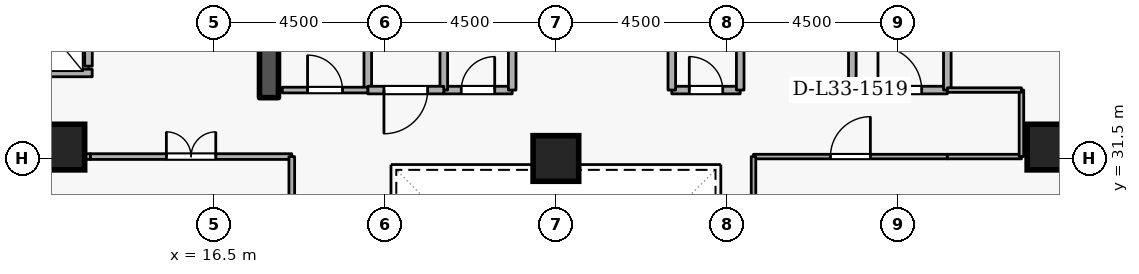
"""IFC4 building model, lengths in metres.
Left out: names, types, materials, properties, quantities, classifications, styles, units other than length and angle.
Written with IfcOpenShell. Run it as: python <this file> out.ifc"""

import sys

from ifc_helpers import new_model, si_unit, direction, frame, frame_2d, origin, origin_2d, place, context, subcontext, project, spatial, rectangle, extrude, element, fill, save


model = new_model("IFC4")
c1 = context("Model", 3, precision=1e-05, world=origin(), true_north=direction((0.0, 1.0)))
c2 = subcontext(c1, "Body", "Model", "MODEL_VIEW")
j1 = project(units=[si_unit("LENGTHUNIT", "METRE"), si_unit("PLANEANGLEUNIT", "RADIAN")], contexts=[c1])
p1 = place(None, origin())
s1 = spatial("IfcSite", under=j1, at=p1, CompositionType="ELEMENT")
p2 = place(p1, origin())
s2 = spatial("IfcBuilding", under=s1, at=p2, CompositionType="ELEMENT")
p3 = place(p2, frame((0.0, 0.0, 126.9)))
s3 = spatial("IfcBuildingStorey", under=s2, at=p3, CompositionType="ELEMENT", Elevation=126.9)
p4 = place(p3, frame((17.95, 33.1, 0.0), z_axis=(0.0, 0.0, 1.0), x_axis=(0.0, 1.0, 0.0)))
e1 = element("IfcWall", 1, at=p4, inside=s3, PredefinedType="SHEAR", context=c2, shape_type="SweptSolid", body=[
    extrude(rectangle(XDim=5.8, YDim=0.5, at=frame_2d((2.9, 0.0))), origin(), (0.0, 0.0, 1.0), 3.6),
])
for number, where, z_axis, x_axis in (
    (2, (12.5, 31.8, 0.0), (0.0, 0.0, 1.0), (1.0, 0.0, 0.0)),
    (3, (38.5, 31.8, 0.0), (0.0, 0.0, 1.0), (1.0, 0.0, 0.0)),
    (4, (25.5, 31.5, 0.0), (0.0, 0.0, 1.0), (1.0, 0.0, 0.0)),
):
    element("IfcColumn", number, at=place(p3, frame(where, z_axis=z_axis, x_axis=x_axis)), inside=s3, PredefinedType="COLUMN", context=c2, shape_type="SweptSolid", body=[
        extrude(rectangle(XDim=1.2, YDim=1.2, at=origin_2d()), origin(), (0.0, 0.0, 1.0), 3.6),
    ])
p5 = place(p3, frame((13.2, 33.93, 0.0), z_axis=(0.0, 0.0, 1.0), x_axis=(0.0, 1.0, 0.0)))
e5 = element("IfcWall", 5, at=p5, inside=s3, PredefinedType="STANDARD", context=c2, shape_type="SweptSolid", body=[
    extrude(rectangle(XDim=1.94, YDim=0.2, at=frame_2d((0.97, 0.0))), origin(), (0.0, 0.0, 1.0), 3.34),
])
p6 = place(p5, frame((0.46, 0.0, 0.0)))
e6 = element("IfcOpeningElement", 6, at=p6, cuts=e5, PredefinedType="OPENING", context=c2, shape_type="SweptSolid", body=[
    extrude(rectangle(XDim=1.02, YDim=2.06, at=frame_2d((0.51, 1.03))), frame((0.0, 0.11, 0.0), z_axis=(0.0, -1.0, 0.0), x_axis=(1.0, 0.0, 0.0)), (0.0, 0.0, 1.0), 0.22),
])
p7 = place(p3, frame((11.002, 33.75, 0.0), z_axis=(0.0, 0.0, 1.0), x_axis=(1.0, 0.0, 0.0)))
e7 = element("IfcWall", 7, at=p7, inside=s3, PredefinedType="STANDARD", context=c2, shape_type="SweptSolid", body=[
    extrude(rectangle(XDim=2.296, YDim=0.2, at=frame_2d((1.148, 0.0))), origin(), (0.0, 0.0, 1.0), 3.34),
])
p8 = place(p3, frame((33.3, 33.3, 0.0), z_axis=(0.0, 0.0, 1.0), x_axis=(1.0, 0.0, 0.0)))
e8 = element("IfcWall", 8, at=p8, inside=s3, PredefinedType="STANDARD", context=c2, shape_type="SweptSolid", body=[
    extrude(rectangle(XDim=2.5, YDim=0.2, at=frame_2d((1.25, 0.0))), origin(), (0.0, 0.0, 1.0), 3.34),
])
p9 = place(p8, frame((0.675, 0.0, 0.0)))
e9 = element("IfcOpeningElement", 9, at=p9, cuts=e8, PredefinedType="OPENING", context=c2, shape_type="SweptSolid", body=[
    extrude(rectangle(XDim=1.15, YDim=2.1, at=frame_2d((0.575, 1.05))), frame((0.0, 0.11, 0.0), z_axis=(0.0, -1.0, 0.0), x_axis=(1.0, 0.0, 0.0)), (0.0, 0.0, 1.0), 0.22),
])
p10 = place(p3, frame((35.8, 33.3, 0.0), z_axis=(0.0, 0.0, 1.0), x_axis=(0.0, 1.0, 0.0)))
e10 = element("IfcWall", 10, at=p10, inside=s3, PredefinedType="STANDARD", context=c2, shape_type="SweptSolid", body=[
    extrude(rectangle(XDim=5.7, YDim=0.2, at=frame_2d((2.85, 0.0))), origin(), (0.0, 0.0, 1.0), 3.34),
])
p11 = place(p3, frame((33.3, 35.6, 0.0), z_axis=(0.0, 0.0, 1.0), x_axis=(0.0, -1.0, 0.0)))
e11 = element("IfcWall", 11, at=p11, inside=s3, PredefinedType="STANDARD", context=c2, shape_type="SweptSolid", body=[
    extrude(rectangle(XDim=2.3, YDim=0.2, at=frame_2d((1.15, 0.0))), origin(), (0.0, 0.0, 1.0), 2.545),
])
p12 = place(p3, frame((22.55, 33.3, 0.0), z_axis=(0.0, 0.0, 1.0), x_axis=(1.0, 0.0, 0.0)))
e12 = element("IfcWall", 12, at=p12, inside=s3, PredefinedType="STANDARD", context=c2, shape_type="SweptSolid", body=[
    extrude(rectangle(XDim=1.8, YDim=0.2, at=frame_2d((0.9, 0.0))), origin(), (0.0, 0.0, 1.0), 3.34),
])
p13 = place(p12, frame((0.46, 0.0, 0.0)))
e13 = element("IfcOpeningElement", 13, at=p13, cuts=e12, PredefinedType="OPENING", context=c2, shape_type="SweptSolid", body=[
    extrude(rectangle(XDim=0.88, YDim=2.04, at=frame_2d((0.44, 1.02))), frame((0.0, 0.11, 0.0), z_axis=(0.0, -1.0, 0.0), x_axis=(1.0, 0.0, 0.0)), (0.0, 0.0, 1.0), 0.22),
])
for number, where, z_axis, x_axis in (
    (14, (24.35, 33.3, 0.0), (0.0, 0.0, 1.0), (0.0, 1.0, 0.0)),
    (15, (22.55, 35.35, 0.0), (0.0, 0.0, 1.0), (0.0, -1.0, 0.0)),
):
    element("IfcWall", number, at=place(p3, frame(where, z_axis=z_axis, x_axis=x_axis)), inside=s3, PredefinedType="STANDARD", context=c2, shape_type="SweptSolid", body=[
        extrude(rectangle(XDim=2.05, YDim=0.2, at=frame_2d((1.025, 0.0))), origin(), (0.0, 0.0, 1.0), 3.34),
    ])
p14 = place(p3, frame((28.55, 33.3, 0.0), z_axis=(0.0, 0.0, 1.0), x_axis=(1.0, 0.0, 0.0)))
e16 = element("IfcWall", 16, at=p14, inside=s3, PredefinedType="STANDARD", context=c2, shape_type="SweptSolid", body=[
    extrude(rectangle(XDim=1.8, YDim=0.2, at=frame_2d((0.9, 0.0))), origin(), (0.0, 0.0, 1.0), 3.34),
])
p15 = place(p14, frame((0.46, 0.0, 0.0)))
e17 = element("IfcOpeningElement", 17, at=p15, cuts=e16, PredefinedType="OPENING", context=c2, shape_type="SweptSolid", body=[
    extrude(rectangle(XDim=0.88, YDim=2.04, at=frame_2d((0.44, 1.02))), frame((0.0, 0.11, 0.0), z_axis=(0.0, -1.0, 0.0), x_axis=(1.0, 0.0, 0.0)), (0.0, 0.0, 1.0), 0.22),
])
for number, where, z_axis, x_axis in (
    (18, (30.35, 33.3, 0.0), (0.0, 0.0, 1.0), (0.0, 1.0, 0.0)),
    (19, (28.55, 35.35, 0.0), (0.0, 0.0, 1.0), (0.0, -1.0, 0.0)),
    (20, (20.55, 33.3, 0.0), (0.0, 0.0, 1.0), (0.0, 1.0, 0.0)),
):
    element("IfcWall", number, at=place(p3, frame(where, z_axis=z_axis, x_axis=x_axis)), inside=s3, PredefinedType="STANDARD", context=c2, shape_type="SweptSolid", body=[
        extrude(rectangle(XDim=2.05, YDim=0.2, at=frame_2d((1.025, 0.0))), origin(), (0.0, 0.0, 1.0), 3.34),
    ])
p16 = place(p3, frame((22.55, 33.3, 0.0), z_axis=(0.0, 0.0, 1.0), x_axis=(-1.0, 0.0, 0.0)))
e21 = element("IfcWall", 21, at=p16, inside=s3, PredefinedType="STANDARD", context=c2, shape_type="SweptSolid", body=[
    extrude(rectangle(XDim=2.0, YDim=0.2, at=frame_2d((1.0, 0.0))), origin(), (0.0, 0.0, 1.0), 3.34),
])
p17 = place(p16, frame((0.425, 0.0, 0.0)))
e22 = element("IfcOpeningElement", 22, at=p17, cuts=e21, PredefinedType="OPENING", context=c2, shape_type="SweptSolid", body=[
    extrude(rectangle(XDim=1.15, YDim=2.1, at=frame_2d((0.575, 1.05))), frame((0.0, 0.11, 0.0), z_axis=(0.0, -1.0, 0.0), x_axis=(1.0, 0.0, 0.0)), (0.0, 0.0, 1.0), 0.22),
])
p18 = place(p3, frame((18.3, 33.3, 0.0), z_axis=(0.0, 0.0, 1.0), x_axis=(1.0, 0.0, 0.0)))
e23 = element("IfcWall", 23, at=p18, inside=s3, PredefinedType="PARTITIONING", context=c2, shape_type="SweptSolid", body=[
    extrude(rectangle(XDim=2.25, YDim=0.15, at=frame_2d((1.125, 0.0))), origin(), (0.0, 0.0, 1.0), 3.34),
])
p19 = place(p18, frame((0.665, 0.0, 0.0)))
e24 = element("IfcOpeningElement", 24, at=p19, cuts=e23, PredefinedType="OPENING", context=c2, shape_type="SweptSolid", body=[
    extrude(rectangle(XDim=0.92, YDim=2.08, at=frame_2d((0.46, 1.04))), frame((0.0, 0.085, 0.0), z_axis=(0.0, -1.0, 0.0), x_axis=(1.0, 0.0, 0.0)), (0.0, 0.0, 1.0), 0.17),
])
p20 = place(p3, frame((13.25, 31.55, 0.0), z_axis=(0.0, 0.0, 1.0), x_axis=(1.0, 0.0, 0.0)))
e25 = element("IfcWall", 25, at=p20, inside=s3, PredefinedType="PARTITIONING", context=c2, shape_type="SweptSolid", body=[
    extrude(rectangle(XDim=5.3, YDim=0.15, at=frame_2d((2.65, 0.0))), origin(), (0.0, 0.0, 1.0), 3.34),
])
p21 = place(p20, frame((2.0, 0.0, 0.0)))
e26 = element("IfcOpeningElement", 26, at=p21, cuts=e25, PredefinedType="OPENING", context=c2, shape_type="SweptSolid", body=[
    extrude(rectangle(XDim=1.3, YDim=2.12, at=frame_2d((0.65, 1.06))), frame((0.0, 0.085, 0.0), z_axis=(0.0, -1.0, 0.0), x_axis=(1.0, 0.0, 0.0)), (0.0, 0.0, 1.0), 0.17),
])
p22 = place(p3, frame((18.55, 31.55, 0.0), z_axis=(0.0, 0.0, 1.0), x_axis=(0.0, -1.0, 0.0)))
e27 = element("IfcWall", 27, at=p22, inside=s3, PredefinedType="PARTITIONING", context=c2, shape_type="SweptSolid", body=[
    extrude(rectangle(XDim=4.55, YDim=0.15, at=frame_2d((2.275, 0.0))), origin(), (0.0, 0.0, 1.0), 3.34),
])
p23 = place(p3, frame((10.9, 31.55, 0.0), z_axis=(0.0, 0.0, 1.0), x_axis=(1.0, 0.0, 0.0)))
e28 = element("IfcWall", 28, at=p23, inside=s3, PredefinedType="PARTITIONING", context=c2, shape_type="SweptSolid", body=[
    extrude(rectangle(XDim=2.35, YDim=0.15, at=frame_2d((1.175, 0.0))), origin(), (0.0, 0.0, 1.0), 3.34),
])
p24 = place(p3, frame((30.7, 31.55, 0.0), z_axis=(0.0, 0.0, 1.0), x_axis=(1.0, 0.0, 0.0)))
e29 = element("IfcWall", 29, at=p24, inside=s3, PredefinedType="PARTITIONING", context=c2, shape_type="SweptSolid", body=[
    extrude(rectangle(XDim=5.1, YDim=0.12, at=frame_2d((2.55, 0.0))), origin(), (0.0, 0.0, 1.0), 3.34),
])
p25 = place(p24, frame((2.025, 0.0, 0.0)))
e30 = element("IfcOpeningElement", 30, at=p25, cuts=e29, PredefinedType="OPENING", context=c2, shape_type="SweptSolid", body=[
    extrude(rectangle(XDim=1.05, YDim=2.1, at=frame_2d((0.525, 1.05))), frame((0.0, 0.07, 0.0), z_axis=(0.0, -1.0, 0.0), x_axis=(1.0, 0.0, 0.0)), (0.0, 0.0, 1.0), 0.14),
])
p26 = place(p3, frame((35.8, 31.55, 0.0), z_axis=(0.0, 0.0, 1.0), x_axis=(1.0, 0.0, 0.0)))
e31 = element("IfcWall", 31, at=p26, inside=s3, PredefinedType="PARTITIONING", context=c2, shape_type="SweptSolid", body=[
    extrude(rectangle(XDim=1.95, YDim=0.12, at=frame_2d((0.975, 0.0))), origin(), (0.0, 0.0, 1.0), 3.34),
])
p27 = place(p3, frame((37.75, 31.55, 0.0), z_axis=(0.0, 0.0, 1.0), x_axis=(0.0, 1.0, 0.0)))
e32 = element("IfcWall", 32, at=p27, inside=s3, PredefinedType="PARTITIONING", context=c2, shape_type="SweptSolid", body=[
    extrude(rectangle(XDim=1.75, YDim=0.12, at=frame_2d((0.875, 0.0))), origin(), (0.0, 0.0, 1.0), 3.34),
])
p28 = place(p3, frame((37.75, 33.3, 0.0), z_axis=(0.0, 0.0, 1.0), x_axis=(-1.0, 0.0, 0.0)))
e33 = element("IfcWall", 33, at=p28, inside=s3, PredefinedType="PARTITIONING", context=c2, shape_type="SweptSolid", body=[
    extrude(rectangle(XDim=1.95, YDim=0.12, at=frame_2d((0.975, 0.0))), origin(), (0.0, 0.0, 1.0), 3.34),
])
p29 = place(p3, frame((30.7, 27.0, 0.0), z_axis=(0.0, 0.0, 1.0), x_axis=(0.0, 1.0, 0.0)))
e34 = element("IfcWall", 34, at=p29, inside=s3, PredefinedType="PARTITIONING", context=c2, shape_type="SweptSolid", body=[
    extrude(rectangle(XDim=4.55, YDim=0.12, at=frame_2d((2.275, 0.0))), origin(), (0.0, 0.0, 1.0), 3.34),
])
p30 = place(p9, origin())
e35 = element("IfcDoor", 35, at=p30, inside=s3, OperationType="SINGLE_SWING_LEFT", PredefinedType="DOOR", context=c2, shape_type="SweptSolid", body=[
    extrude(rectangle(XDim=1.15, YDim=2.1, at=frame_2d((0.575, 1.05))), frame((0.0, 0.025, 0.0), z_axis=(0.0, -1.0, 0.0), x_axis=(1.0, 0.0, 0.0)), (0.0, 0.0, 1.0), 0.05),
])
fill(e9, e35)
p31 = place(p13, origin())
e36 = element("IfcDoor", 36, at=p31, inside=s3, OperationType="SINGLE_SWING_RIGHT", PredefinedType="DOOR", context=c2, shape_type="SweptSolid", body=[
    extrude(rectangle(XDim=0.88, YDim=2.04, at=frame_2d((0.44, 1.02))), frame((0.0, 0.025, 0.0), z_axis=(0.0, -1.0, 0.0), x_axis=(1.0, 0.0, 0.0)), (0.0, 0.0, 1.0), 0.05),
])
fill(e13, e36)
p32 = place(p15, origin())
e37 = element("IfcDoor", 37, at=p32, inside=s3, OperationType="SINGLE_SWING_LEFT", PredefinedType="DOOR", context=c2, shape_type="SweptSolid", body=[
    extrude(rectangle(XDim=0.88, YDim=2.04, at=frame_2d((0.44, 1.02))), frame((0.0, 0.025, 0.0), z_axis=(0.0, -1.0, 0.0), x_axis=(1.0, 0.0, 0.0)), (0.0, 0.0, 1.0), 0.05),
])
fill(e17, e37)
p33 = place(p19, origin())
e38 = element("IfcDoor", 38, at=p33, inside=s3, OperationType="SINGLE_SWING_LEFT", PredefinedType="DOOR", context=c2, shape_type="SweptSolid", body=[
    extrude(rectangle(XDim=0.92, YDim=2.08, at=frame_2d((0.46, 1.04))), frame((0.0, 0.025, 0.0), z_axis=(0.0, -1.0, 0.0), x_axis=(1.0, 0.0, 0.0)), (0.0, 0.0, 1.0), 0.05),
])
fill(e24, e38)
p34 = place(p17, origin())
e39 = element("IfcDoor", 39, at=p34, inside=s3, OperationType="SINGLE_SWING_RIGHT", PredefinedType="DOOR", context=c2, shape_type="SweptSolid", body=[
    extrude(rectangle(XDim=1.15, YDim=2.1, at=frame_2d((0.575, 1.05))), frame((0.0, 0.025, 0.0), z_axis=(0.0, -1.0, 0.0), x_axis=(1.0, 0.0, 0.0)), (0.0, 0.0, 1.0), 0.05),
])
fill(e22, e39)
p35 = place(p21, origin())
e40 = element("IfcDoor", 40, at=p35, inside=s3, OperationType="DOUBLE_DOOR_SINGLE_SWING", PredefinedType="DOOR", context=c2, shape_type="SweptSolid", body=[
    extrude(rectangle(XDim=1.3, YDim=2.12, at=frame_2d((0.65, 1.06))), frame((0.0, 0.025, 0.0), z_axis=(0.0, -1.0, 0.0), x_axis=(1.0, 0.0, 0.0)), (0.0, 0.0, 1.0), 0.05),
])
fill(e26, e40)
p36 = place(p25, origin())
e41 = element("IfcDoor", 41, at=p36, inside=s3, OperationType="SINGLE_SWING_RIGHT", PredefinedType="DOOR", context=c2, shape_type="SweptSolid", body=[
    extrude(rectangle(XDim=1.05, YDim=2.1, at=frame_2d((0.525, 1.05))), frame((0.0, 0.025, 0.0), z_axis=(0.0, -1.0, 0.0), x_axis=(1.0, 0.0, 0.0)), (0.0, 0.0, 1.0), 0.05),
])
fill(e30, e41)
save(model, sys.argv[1])
